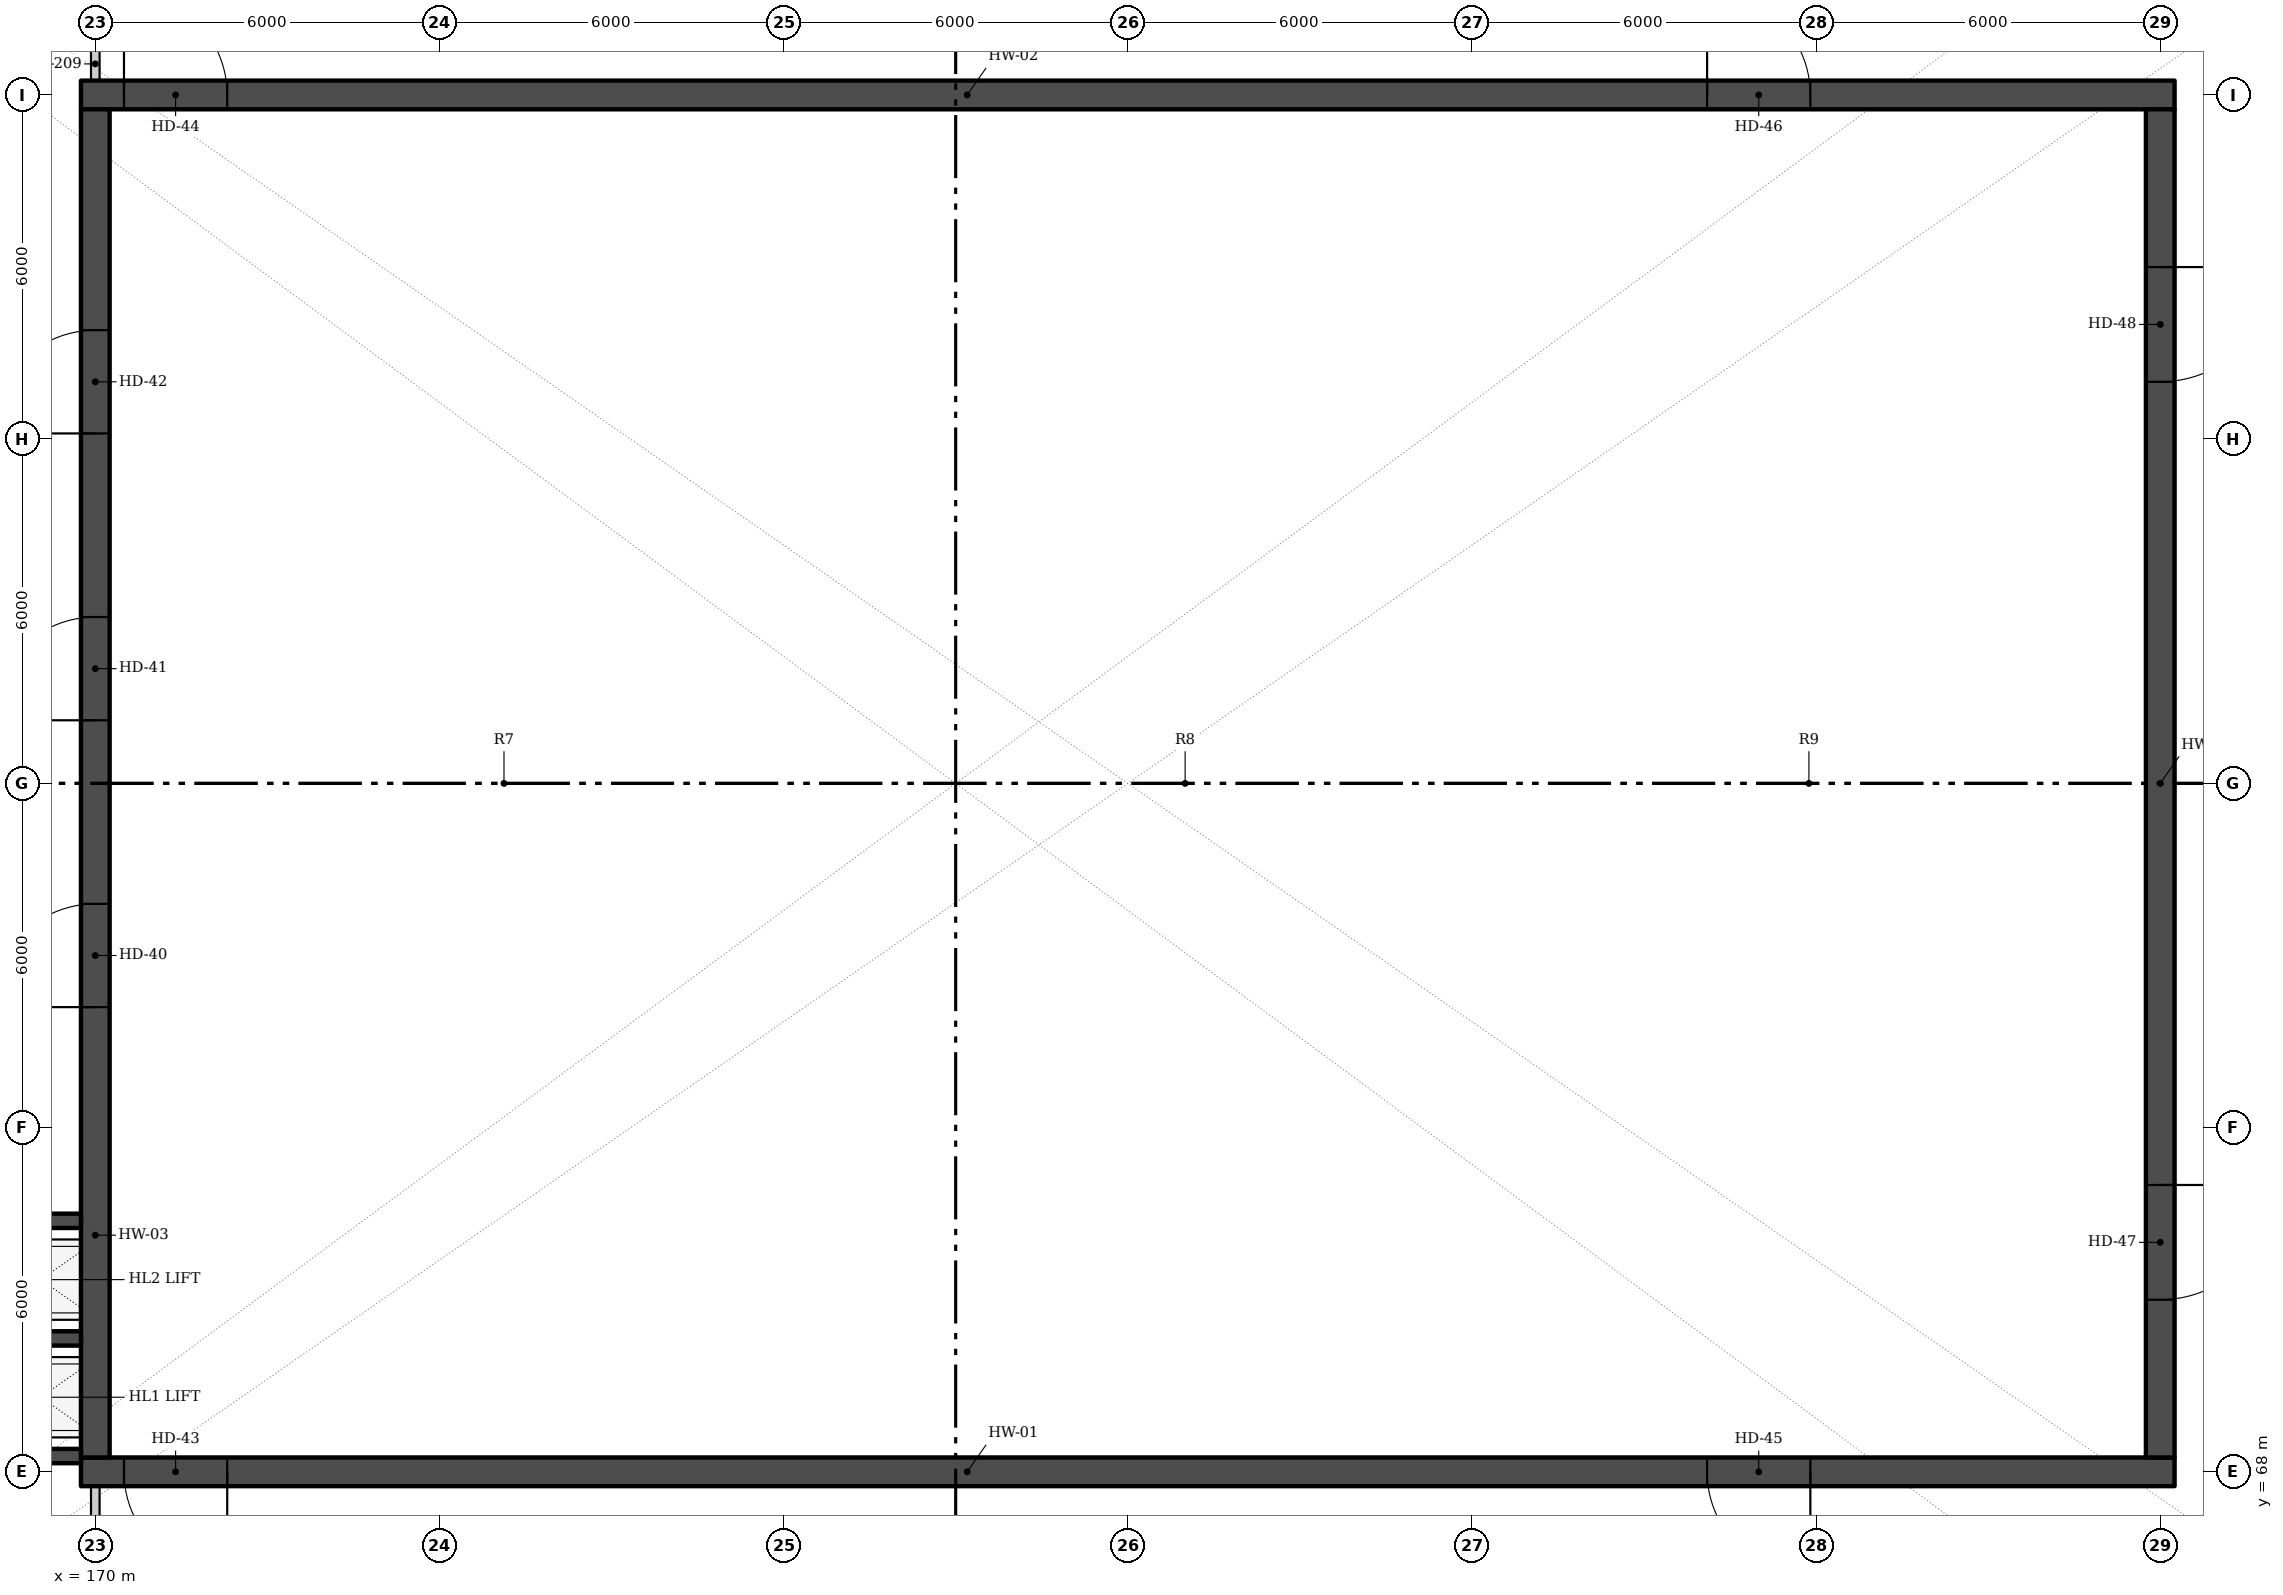
"""IFC4 building model, lengths in metres.
Left out: names, types, materials, properties, quantities, classifications, styles, units other than length and angle.
Written with IfcOpenShell. Run it as: python <this file> out.ifc"""

import sys

from ifc_helpers import new_model, si_unit, direction, frame, frame_2d, origin, place, context, subcontext, project, spatial, rectangle, extrude, element, fill, save


model = new_model("IFC4")
c1 = context("Model", 3, precision=1e-05, world=origin(), true_north=direction((0.0, 1.0)))
c2 = subcontext(c1, "Body", "Model", "MODEL_VIEW")
j1 = project(units=[si_unit("LENGTHUNIT", "METRE"), si_unit("PLANEANGLEUNIT", "RADIAN")], contexts=[c1])
p1 = place(None, origin())
s1 = spatial("IfcSite", under=j1, at=p1, CompositionType="ELEMENT")
p2 = place(p1, origin())
s2 = spatial("IfcBuilding", under=s1, at=p2, CompositionType="ELEMENT")
p3 = place(p2, origin())
s3 = spatial("IfcBuildingStorey", under=s2, at=p3, CompositionType="ELEMENT", Elevation=0.0)
p4 = place(p3, frame((206.25, 68.0, 0.0), z_axis=(0.0, 0.0, 1.0), x_axis=(-1.0, 0.0, 0.0)))
e1 = element("IfcWall", 1, at=p4, inside=s3, PredefinedType="SHEAR", context=c2, shape_type="SweptSolid", body=[
    extrude(rectangle(XDim=36.5, YDim=0.5, at=frame_2d((18.25, 0.0))), origin(), (0.0, 0.0, 1.0), 6.6),
])
p5 = place(p4, frame((33.95, 0.0, 0.0)))
e2 = element("IfcOpeningElement", 2, at=p5, cuts=e1, PredefinedType="OPENING", context=c2, shape_type="SweptSolid", body=[
    extrude(rectangle(XDim=1.8, YDim=2.4, at=frame_2d((0.9, 1.2))), frame((0.0, 0.26, 0.0), z_axis=(0.0, -1.0, 0.0), x_axis=(1.0, 0.0, 0.0)), (0.0, 0.0, 1.0), 0.52),
])
p6 = place(p4, frame((6.35, 0.0, 0.0)))
e3 = element("IfcOpeningElement", 3, at=p6, cuts=e1, PredefinedType="OPENING", context=c2, shape_type="SweptSolid", body=[
    extrude(rectangle(XDim=1.8, YDim=2.4, at=frame_2d((0.9, 1.2))), frame((0.0, 0.26, 0.0), z_axis=(0.0, -1.0, 0.0), x_axis=(1.0, 0.0, 0.0)), (0.0, 0.0, 1.0), 0.52),
])
p7 = place(p3, frame((169.75, 92.0, 0.0), z_axis=(0.0, 0.0, 1.0), x_axis=(1.0, 0.0, 0.0)))
e4 = element("IfcWall", 4, at=p7, inside=s3, PredefinedType="SHEAR", context=c2, shape_type="SweptSolid", body=[
    extrude(rectangle(XDim=36.5, YDim=0.5, at=frame_2d((18.25, 0.0))), origin(), (0.0, 0.0, 1.0), 6.6),
])
p8 = place(p7, frame((0.75, 0.0, 0.0)))
e5 = element("IfcOpeningElement", 5, at=p8, cuts=e4, PredefinedType="OPENING", context=c2, shape_type="SweptSolid", body=[
    extrude(rectangle(XDim=1.8, YDim=2.4, at=frame_2d((0.9, 1.2))), frame((0.0, 0.26, 0.0), z_axis=(0.0, -1.0, 0.0), x_axis=(1.0, 0.0, 0.0)), (0.0, 0.0, 1.0), 0.52),
])
p9 = place(p7, frame((28.35, 0.0, 0.0)))
e6 = element("IfcOpeningElement", 6, at=p9, cuts=e4, PredefinedType="OPENING", context=c2, shape_type="SweptSolid", body=[
    extrude(rectangle(XDim=1.8, YDim=2.4, at=frame_2d((0.9, 1.2))), frame((0.0, 0.26, 0.0), z_axis=(0.0, -1.0, 0.0), x_axis=(1.0, 0.0, 0.0)), (0.0, 0.0, 1.0), 0.52),
])
p10 = place(p3, frame((170.0, 68.25, 0.0), z_axis=(0.0, 0.0, 1.0), x_axis=(0.0, 1.0, 0.0)))
e7 = element("IfcWall", 7, at=p10, inside=s3, PredefinedType="SHEAR", context=c2, shape_type="SweptSolid", body=[
    extrude(rectangle(XDim=23.5, YDim=0.5, at=frame_2d((11.75, 0.0))), origin(), (0.0, 0.0, 1.0), 6.6),
])
p11 = place(p10, frame((7.85, 0.0, 0.0)))
e8 = element("IfcOpeningElement", 8, at=p11, cuts=e7, PredefinedType="OPENING", context=c2, shape_type="SweptSolid", body=[
    extrude(rectangle(XDim=1.8, YDim=2.4, at=frame_2d((0.9, 1.2))), frame((0.0, 0.26, 0.0), z_axis=(0.0, -1.0, 0.0), x_axis=(1.0, 0.0, 0.0)), (0.0, 0.0, 1.0), 0.52),
])
p12 = place(p10, frame((12.85, 0.0, 0.0)))
e9 = element("IfcOpeningElement", 9, at=p12, cuts=e7, PredefinedType="OPENING", context=c2, shape_type="SweptSolid", body=[
    extrude(rectangle(XDim=1.8, YDim=2.4, at=frame_2d((0.9, 1.2))), frame((0.0, 0.26, 0.0), z_axis=(0.0, -1.0, 0.0), x_axis=(1.0, 0.0, 0.0)), (0.0, 0.0, 1.0), 0.52),
])
p13 = place(p10, frame((17.85, 0.0, 0.0)))
e10 = element("IfcOpeningElement", 10, at=p13, cuts=e7, PredefinedType="OPENING", context=c2, shape_type="SweptSolid", body=[
    extrude(rectangle(XDim=1.8, YDim=2.4, at=frame_2d((0.9, 1.2))), frame((0.0, 0.26, 0.0), z_axis=(0.0, -1.0, 0.0), x_axis=(1.0, 0.0, 0.0)), (0.0, 0.0, 1.0), 0.52),
])
p14 = place(p3, frame((206.0, 91.75, 0.0), z_axis=(0.0, 0.0, 1.0), x_axis=(0.0, -1.0, 0.0)))
e11 = element("IfcWall", 11, at=p14, inside=s3, PredefinedType="SHEAR", context=c2, shape_type="SweptSolid", body=[
    extrude(rectangle(XDim=23.5, YDim=0.5, at=frame_2d((11.75, 0.0))), origin(), (0.0, 0.0, 1.0), 6.6),
])
p15 = place(p14, frame((18.75, 0.0, 0.0)))
e12 = element("IfcOpeningElement", 12, at=p15, cuts=e11, PredefinedType="OPENING", context=c2, shape_type="SweptSolid", body=[
    extrude(rectangle(XDim=2.0, YDim=2.6, at=frame_2d((1.0, 1.3))), frame((0.0, 0.26, 0.0), z_axis=(0.0, -1.0, 0.0), x_axis=(1.0, 0.0, 0.0)), (0.0, 0.0, 1.0), 0.52),
])
p16 = place(p14, frame((2.75, 0.0, 0.0)))
e13 = element("IfcOpeningElement", 13, at=p16, cuts=e11, PredefinedType="OPENING", context=c2, shape_type="SweptSolid", body=[
    extrude(rectangle(XDim=2.0, YDim=2.6, at=frame_2d((1.0, 1.3))), frame((0.0, 0.26, 0.0), z_axis=(0.0, -1.0, 0.0), x_axis=(1.0, 0.0, 0.0)), (0.0, 0.0, 1.0), 0.52),
])
for number, where, z_axis, x_axis in (
    (14, (167.725, 70.325, 0.0), (0.0, 0.0, 1.0), (1.0, 0.0, 0.0)),
    (15, (169.75, 72.375, 0.0), (0.0, 0.0, 1.0), (-1.0, 0.0, 0.0)),
    (16, (167.725, 68.275, 0.0), (0.0, 0.0, 1.0), (1.0, 0.0, 0.0)),
):
    element("IfcWall", number, at=place(p3, frame(where, z_axis=z_axis, x_axis=x_axis)), inside=s3, PredefinedType="SOLIDWALL", context=c2, shape_type="SweptSolid", body=[
        extrude(rectangle(XDim=2.025, YDim=0.25, at=frame_2d((1.012, 0.0))), origin(), (0.0, 0.0, 1.0), 6.6),
    ])
p17 = place(p3, frame((170.0, 67.75, 0.0), z_axis=(0.0, 0.0, 1.0), x_axis=(0.0, -1.0, 0.0)))
e17 = element("IfcWall", 17, at=p17, inside=s3, PredefinedType="PARTITIONING", context=c2, shape_type="SweptSolid", body=[
    extrude(rectangle(XDim=2.965, YDim=0.15, at=frame_2d((1.482, 0.0))), origin(), (0.0, 0.0, 1.0), 6.25),
])
p18 = place(p17, frame((0.683, 0.0, 0.0)))
e18 = element("IfcOpeningElement", 18, at=p18, cuts=e17, PredefinedType="OPENING", context=c2, shape_type="SweptSolid", body=[
    extrude(rectangle(XDim=1.6, YDim=2.1, at=frame_2d((0.8, 1.05))), frame((0.0, 0.085, 0.0), z_axis=(0.0, -1.0, 0.0), x_axis=(1.0, 0.0, 0.0)), (0.0, 0.0, 1.0), 0.17),
])
p19 = place(p3, frame((170.0, 95.215, 0.0), z_axis=(0.0, 0.0, 1.0), x_axis=(0.0, -1.0, 0.0)))
e19 = element("IfcWall", 19, at=p19, inside=s3, PredefinedType="PARTITIONING", context=c2, shape_type="SweptSolid", body=[
    extrude(rectangle(XDim=2.965, YDim=0.15, at=frame_2d((1.482, 0.0))), origin(), (0.0, 0.0, 1.0), 6.25),
])
p20 = place(p19, frame((0.683, 0.0, 0.0)))
e20 = element("IfcOpeningElement", 20, at=p20, cuts=e19, PredefinedType="OPENING", context=c2, shape_type="SweptSolid", body=[
    extrude(rectangle(XDim=1.6, YDim=2.1, at=frame_2d((0.8, 1.05))), frame((0.0, 0.085, 0.0), z_axis=(0.0, -1.0, 0.0), x_axis=(1.0, 0.0, 0.0)), (0.0, 0.0, 1.0), 0.17),
])
p21 = place(p11, origin())
e21 = element("IfcDoor", 21, at=p21, inside=s3, OperationType="DOUBLE_DOOR_SINGLE_SWING", PredefinedType="DOOR", context=c2, shape_type="SweptSolid", body=[
    extrude(rectangle(XDim=1.8, YDim=2.4, at=frame_2d((0.9, 1.2))), frame((0.0, 0.025, 0.0), z_axis=(0.0, -1.0, 0.0), x_axis=(1.0, 0.0, 0.0)), (0.0, 0.0, 1.0), 0.05),
])
fill(e8, e21)
p22 = place(p12, origin())
e22 = element("IfcDoor", 22, at=p22, inside=s3, OperationType="DOUBLE_DOOR_SINGLE_SWING", PredefinedType="DOOR", context=c2, shape_type="SweptSolid", body=[
    extrude(rectangle(XDim=1.8, YDim=2.4, at=frame_2d((0.9, 1.2))), frame((0.0, 0.025, 0.0), z_axis=(0.0, -1.0, 0.0), x_axis=(1.0, 0.0, 0.0)), (0.0, 0.0, 1.0), 0.05),
])
fill(e9, e22)
p23 = place(p13, origin())
e23 = element("IfcDoor", 23, at=p23, inside=s3, OperationType="DOUBLE_DOOR_SINGLE_SWING", PredefinedType="DOOR", context=c2, shape_type="SweptSolid", body=[
    extrude(rectangle(XDim=1.8, YDim=2.4, at=frame_2d((0.9, 1.2))), frame((0.0, 0.025, 0.0), z_axis=(0.0, -1.0, 0.0), x_axis=(1.0, 0.0, 0.0)), (0.0, 0.0, 1.0), 0.05),
])
fill(e10, e23)
p24 = place(p5, origin())
e24 = element("IfcDoor", 24, at=p24, inside=s3, OperationType="DOUBLE_DOOR_SINGLE_SWING", PredefinedType="DOOR", context=c2, shape_type="SweptSolid", body=[
    extrude(rectangle(XDim=1.8, YDim=2.4, at=frame_2d((0.9, 1.2))), frame((0.0, 0.025, 0.0), z_axis=(0.0, -1.0, 0.0), x_axis=(1.0, 0.0, 0.0)), (0.0, 0.0, 1.0), 0.05),
])
fill(e2, e24)
p25 = place(p8, origin())
e25 = element("IfcDoor", 25, at=p25, inside=s3, OperationType="DOUBLE_DOOR_SINGLE_SWING", PredefinedType="DOOR", context=c2, shape_type="SweptSolid", body=[
    extrude(rectangle(XDim=1.8, YDim=2.4, at=frame_2d((0.9, 1.2))), frame((0.0, 0.025, 0.0), z_axis=(0.0, -1.0, 0.0), x_axis=(1.0, 0.0, 0.0)), (0.0, 0.0, 1.0), 0.05),
])
fill(e5, e25)
p26 = place(p6, origin())
e26 = element("IfcDoor", 26, at=p26, inside=s3, OperationType="DOUBLE_DOOR_SINGLE_SWING", PredefinedType="DOOR", context=c2, shape_type="SweptSolid", body=[
    extrude(rectangle(XDim=1.8, YDim=2.4, at=frame_2d((0.9, 1.2))), frame((0.0, 0.025, 0.0), z_axis=(0.0, -1.0, 0.0), x_axis=(1.0, 0.0, 0.0)), (0.0, 0.0, 1.0), 0.05),
])
fill(e3, e26)
p27 = place(p9, origin())
e27 = element("IfcDoor", 27, at=p27, inside=s3, OperationType="DOUBLE_DOOR_SINGLE_SWING", PredefinedType="DOOR", context=c2, shape_type="SweptSolid", body=[
    extrude(rectangle(XDim=1.8, YDim=2.4, at=frame_2d((0.9, 1.2))), frame((0.0, 0.025, 0.0), z_axis=(0.0, -1.0, 0.0), x_axis=(1.0, 0.0, 0.0)), (0.0, 0.0, 1.0), 0.05),
])
fill(e6, e27)
p28 = place(p15, origin())
e28 = element("IfcDoor", 28, at=p28, inside=s3, OperationType="DOUBLE_DOOR_SINGLE_SWING", PredefinedType="DOOR", context=c2, shape_type="SweptSolid", body=[
    extrude(rectangle(XDim=2.0, YDim=2.6, at=frame_2d((1.0, 1.3))), frame((0.0, 0.025, 0.0), z_axis=(0.0, -1.0, 0.0), x_axis=(1.0, 0.0, 0.0)), (0.0, 0.0, 1.0), 0.05),
])
fill(e12, e28)
p29 = place(p16, origin())
e29 = element("IfcDoor", 29, at=p29, inside=s3, OperationType="DOUBLE_DOOR_SINGLE_SWING", PredefinedType="DOOR", context=c2, shape_type="SweptSolid", body=[
    extrude(rectangle(XDim=2.0, YDim=2.6, at=frame_2d((1.0, 1.3))), frame((0.0, 0.025, 0.0), z_axis=(0.0, -1.0, 0.0), x_axis=(1.0, 0.0, 0.0)), (0.0, 0.0, 1.0), 0.05),
])
fill(e13, e29)
save(model, sys.argv[1])
